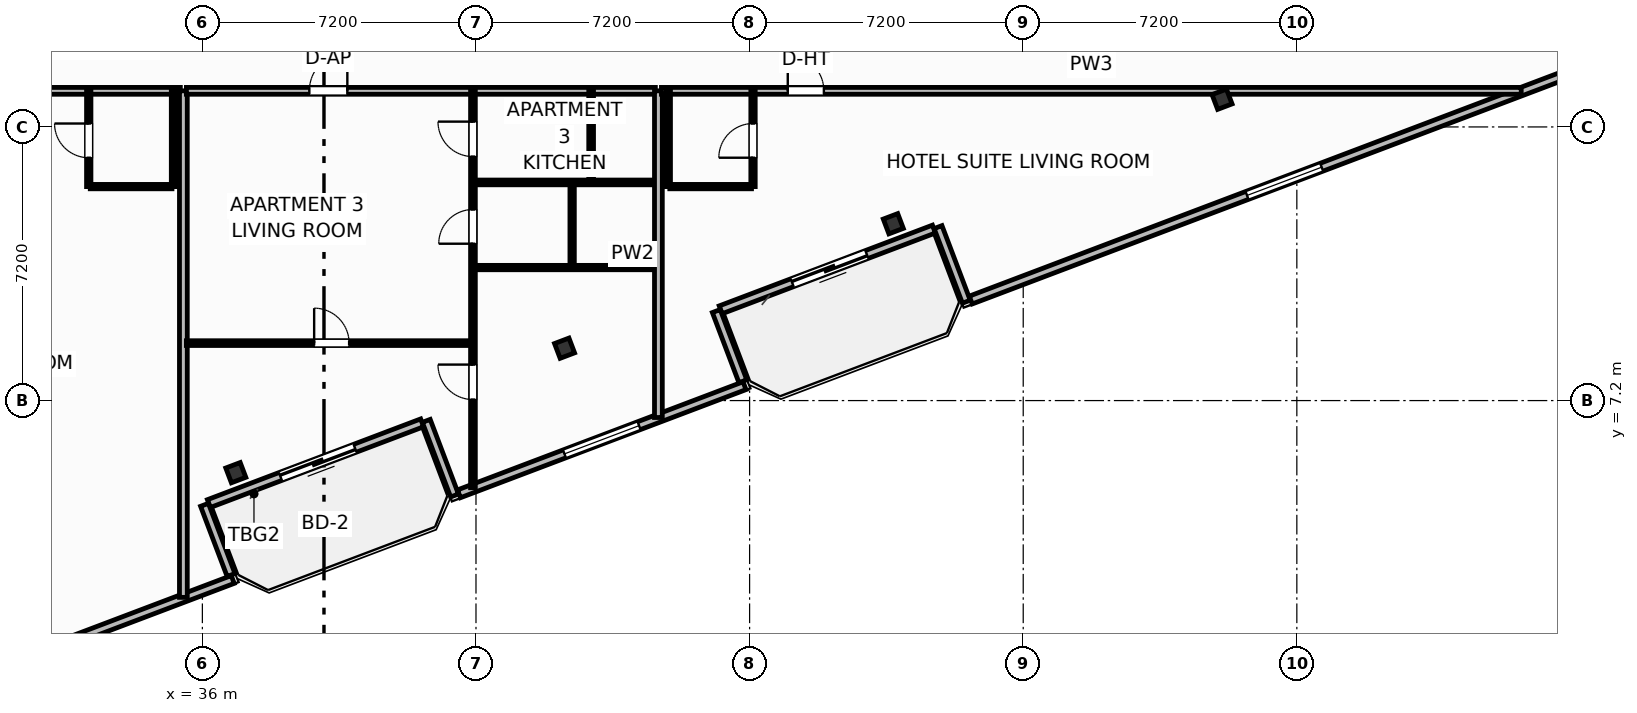
"""IFC4 building model, lengths in metres.
Left out: names, types, materials, properties, quantities, classifications, styles, units other than length and angle.
Written with IfcOpenShell. Run it as: python <this file> out.ifc"""

import sys

from ifc_helpers import new_model, si_unit, direction, frame, frame_2d, origin, origin_2d, place, context, subcontext, project, spatial, rectangle, i_section, extrude, element, fill, save


model = new_model("IFC4")
c1 = context("Model", 3, precision=1e-05, world=origin(), true_north=direction((0.0, 1.0)))
c2 = subcontext(c1, "Body", "Model", "MODEL_VIEW")
j1 = project(units=[si_unit("LENGTHUNIT", "METRE"), si_unit("PLANEANGLEUNIT", "RADIAN")], contexts=[c1])
p1 = place(None, origin())
s1 = spatial("IfcSite", under=j1, at=p1, CompositionType="ELEMENT")
p2 = place(p1, origin())
s2 = spatial("IfcBuilding", under=s1, at=p2, CompositionType="ELEMENT")
p3 = place(p2, frame((0.0, 0.0, 231.2)))
s3 = spatial("IfcBuildingStorey", under=s2, at=p3, CompositionType="ELEMENT", Elevation=231.2)
for number, where, z_axis, x_axis in (
    (1, (36.88, 5.303, 0.0), (0.0, 0.0, 1.0), (0.935, 0.354, 0.0)),
    (2, (45.531, 8.578, 0.0), (0.0, 0.0, 1.0), (0.935, 0.354, 0.0)),
    (3, (54.181, 11.853, 0.0), (0.0, 0.0, 1.0), (0.935, 0.354, 0.0)),
    (4, (62.832, 15.128, 0.0), (0.0, 0.0, 1.0), (0.935, 0.354, 0.0)),
):
    element("IfcColumn", number, at=place(p3, frame(where, z_axis=z_axis, x_axis=x_axis)), inside=s3, PredefinedType="COLUMN", context=c2, shape_type="SweptSolid", body=[
        extrude(i_section(OverallWidth=0.406, OverallDepth=0.416, WebThickness=0.03, FlangeThickness=0.048, FilletRadius=0.025, at=origin_2d()), origin(), (0.0, 0.0, 1.0), 3.7),
    ])
p4 = place(p3, frame((41.783, 6.614, 0.0), z_axis=(0.0, 0.0, 1.0), x_axis=(-0.93521416643, -0.354082565101, 0.0)))
e5 = element("IfcWall", 5, at=p4, inside=s3, PredefinedType="SOLIDWALL", context=c2, shape_type="SweptSolid", body=[
    extrude(rectangle(XDim=6.0, YDim=0.22, at=frame_2d((3.0, 0.0))), origin(), (0.0, 0.0, 1.0), 2.73),
])
p5 = place(p4, frame((1.888, 0.0, 0.0)))
e6 = element("IfcOpeningElement", 6, at=p5, cuts=e5, PredefinedType="OPENING", context=c2, shape_type="SweptSolid", body=[
    extrude(rectangle(XDim=2.1, YDim=2.3, at=frame_2d((1.05, 1.15))), frame((0.0, 0.12, 0.0), z_axis=(0.0, -1.0, 0.0), x_axis=(1.0, 0.0, 0.0)), (0.0, 0.0, 1.0), 0.24),
])
p6 = place(p3, frame((55.25, 11.713, 0.0), z_axis=(0.0, 0.0, 1.0), x_axis=(-0.935227640088, -0.354046976001, 0.0)))
e7 = element("IfcWall", 7, at=p6, inside=s3, PredefinedType="SOLIDWALL", context=c2, shape_type="SweptSolid", body=[
    extrude(rectangle(XDim=6.0, YDim=0.22, at=frame_2d((3.0, 0.0))), origin(), (0.0, 0.0, 1.0), 2.73),
])
p7 = place(p6, frame((1.888, 0.0, 0.0)))
e8 = element("IfcOpeningElement", 8, at=p7, cuts=e7, PredefinedType="OPENING", context=c2, shape_type="SweptSolid", body=[
    extrude(rectangle(XDim=2.1, YDim=2.3, at=frame_2d((1.05, 1.15))), frame((0.0, 0.12, 0.0), z_axis=(0.0, -1.0, 0.0), x_axis=(1.0, 0.0, 0.0)), (0.0, 0.0, 1.0), 0.24),
])
p8 = place(p3, frame((20.202, -3.791, 0.0), z_axis=(0.0, 0.0, 1.0), x_axis=(0.935225574232, 0.354052432984, 0.0)))
e9 = element("IfcWall", 9, at=p8, inside=s3, PredefinedType="SOLIDWALL", context=c2, shape_type="SweptSolid", body=[
    extrude(rectangle(XDim=17.747, YDim=0.22, at=frame_2d((8.874, 0.0))), origin(), (0.0, 0.0, 1.0), 2.73),
])
p9 = place(p8, frame((7.823, 0.0, 0.8)))
e10 = element("IfcOpeningElement", 10, at=p9, cuts=e9, PredefinedType="OPENING", context=c2, shape_type="SweptSolid", body=[
    extrude(rectangle(XDim=2.1, YDim=1.75, at=frame_2d((1.05, 0.875))), frame((0.0, 0.12, 0.0), z_axis=(0.0, -1.0, 0.0), x_axis=(1.0, 0.0, 0.0)), (0.0, 0.0, 1.0), 0.24),
])
p10 = place(p3, frame((36.755, 2.61, 0.0), z_axis=(0.0, 0.0, 1.0), x_axis=(-0.354020680661, 0.935237594232, 0.0)))
e11 = element("IfcWall", 11, at=p10, inside=s3, PredefinedType="SOLIDWALL", context=c2, shape_type="SweptSolid", body=[
    extrude(rectangle(XDim=1.975, YDim=0.22, at=frame_2d((0.988, 0.0))), origin(), (0.0, 0.0, 1.0), 2.73),
])
p11 = place(p3, frame((41.892, 6.666, 0.0), z_axis=(0.0, 0.0, 1.0), x_axis=(0.354128469405, -0.935196785258, 0.0)))
e12 = element("IfcWall", 12, at=p11, inside=s3, PredefinedType="SOLIDWALL", context=c2, shape_type="SweptSolid", body=[
    extrude(rectangle(XDim=2.1, YDim=0.22, at=frame_2d((1.05, 0.0))), origin(), (0.0, 0.0, 1.0), 2.73),
])
p12 = place(p3, frame((42.752, 4.746, 0.0), z_axis=(0.0, 0.0, 1.0), x_axis=(0.935216926991, 0.354075273733, 0.0)))
e13 = element("IfcWall", 13, at=p12, inside=s3, PredefinedType="SOLIDWALL", context=c2, shape_type="SweptSolid", body=[
    extrude(rectangle(XDim=8.035, YDim=0.22, at=frame_2d((4.018, 0.0))), origin(), (0.0, 0.0, 1.0), 2.73),
])
p13 = place(p12, frame((2.968, 0.0, 0.8)))
e14 = element("IfcOpeningElement", 14, at=p13, cuts=e13, PredefinedType="OPENING", context=c2, shape_type="SweptSolid", body=[
    extrude(rectangle(XDim=2.1, YDim=1.75, at=frame_2d((1.05, 0.875))), frame((0.0, 0.12, 0.0), z_axis=(0.0, -1.0, 0.0), x_axis=(1.0, 0.0, 0.0)), (0.0, 0.0, 1.0), 0.24),
])
p14 = place(p3, frame((50.223, 7.708, 0.0), z_axis=(0.0, 0.0, 1.0), x_axis=(-0.354020680661, 0.935237594232, 0.0)))
e15 = element("IfcWall", 15, at=p14, inside=s3, PredefinedType="SOLIDWALL", context=c2, shape_type="SweptSolid", body=[
    extrude(rectangle(XDim=1.975, YDim=0.22, at=frame_2d((0.988, 0.0))), origin(), (0.0, 0.0, 1.0), 2.73),
])
p15 = place(p3, frame((55.359, 11.764, 0.0), z_axis=(0.0, 0.0, 1.0), x_axis=(0.354026782794, -0.935235284334, 0.0)))
e16 = element("IfcWall", 16, at=p15, inside=s3, PredefinedType="SOLIDWALL", context=c2, shape_type="SweptSolid", body=[
    extrude(rectangle(XDim=2.1, YDim=0.22, at=frame_2d((1.05, 0.0))), origin(), (0.0, 0.0, 1.0), 2.73),
])
p16 = place(p3, frame((56.219, 9.845, 0.0), z_axis=(0.0, 0.0, 1.0), x_axis=(0.935225601791, 0.354052360188, 0.0)))
e17 = element("IfcWall", 17, at=p16, inside=s3, PredefinedType="SOLIDWALL", context=c2, shape_type="SweptSolid", body=[
    extrude(rectangle(XDim=17.647, YDim=0.22, at=frame_2d((8.824, 0.0))), origin(), (0.0, 0.0, 1.0), 2.73),
])
p17 = place(p16, frame((7.774, 0.0, 0.8)))
e18 = element("IfcOpeningElement", 18, at=p17, cuts=e17, PredefinedType="OPENING", context=c2, shape_type="SweptSolid", body=[
    extrude(rectangle(XDim=2.1, YDim=1.75, at=frame_2d((1.05, 0.875))), frame((0.0, 0.12, 0.0), z_axis=(0.0, -1.0, 0.0), x_axis=(1.0, 0.0, 0.0)), (0.0, 0.0, 1.0), 0.24),
])
p18 = place(p3, frame((23.08, 15.35, 0.0), z_axis=(0.0, 0.0, 1.0), x_axis=(1.0, 0.0, 0.0)))
e19 = element("IfcWall", 19, at=p18, inside=s3, PredefinedType="PARTITIONING", context=c2, shape_type="SweptSolid", body=[
    extrude(rectangle(XDim=12.34, YDim=0.18, at=frame_2d((6.17, 0.0))), origin(), (0.0, 0.0, 1.0), 3.45),
])
p19 = place(p18, frame((0.933, 0.0, 0.0)))
e20 = element("IfcOpeningElement", 20, at=p19, cuts=e19, PredefinedType="OPENING", context=c2, shape_type="SweptSolid", body=[
    extrude(rectangle(XDim=0.95, YDim=2.15, at=frame_2d((0.475, 1.075))), frame((0.0, 0.1, 0.0), z_axis=(0.0, -1.0, 0.0), x_axis=(1.0, 0.0, 0.0)), (0.0, 0.0, 1.0), 0.2),
])
p20 = place(p3, frame((33.05, 12.83, 0.0), z_axis=(0.0, 0.0, 1.0), x_axis=(1.0, 0.0, 0.0)))
e21 = element("IfcWall", 21, at=p20, inside=s3, PredefinedType="PARTITIONING", context=c2, shape_type="SweptSolid", body=[
    extrude(rectangle(XDim=2.15, YDim=0.115, at=frame_2d((1.075, 0.0))), origin(), (0.0, 0.0, 1.0), 3.45),
])
p21 = place(p3, frame((33.01, 12.83, 0.0), z_axis=(0.0, 0.0, 1.0), x_axis=(0.0, 1.0, 0.0)))
e22 = element("IfcWall", 22, at=p21, inside=s3, PredefinedType="PARTITIONING", context=c2, shape_type="SweptSolid", body=[
    extrude(rectangle(XDim=2.52, YDim=0.115, at=frame_2d((1.26, 0.0))), origin(), (0.0, 0.0, 1.0), 3.45),
])
p22 = place(p21, frame((0.76, 0.0, 0.0)))
e23 = element("IfcOpeningElement", 23, at=p22, cuts=e22, PredefinedType="OPENING", context=c2, shape_type="SweptSolid", body=[
    extrude(rectangle(XDim=0.9, YDim=2.05, at=frame_2d((0.45, 1.025))), frame((0.0, 0.067, 0.0), z_axis=(0.0, -1.0, 0.0), x_axis=(1.0, 0.0, 0.0)), (0.0, 0.0, 1.0), 0.135),
])
p23 = place(p3, frame((35.24, 12.83, 0.0), z_axis=(0.0, 0.0, 1.0), x_axis=(0.0, 1.0, 0.0)))
e24 = element("IfcWall", 24, at=p23, inside=s3, PredefinedType="PARTITIONING", context=c2, shape_type="SweptSolid", body=[
    extrude(rectangle(XDim=2.52, YDim=0.115, at=frame_2d((1.26, 0.0))), origin(), (0.0, 0.0, 1.0), 2.739),
])
p24 = place(p3, frame((35.5, 2.022, 0.0), z_axis=(0.0, 0.0, 1.0), x_axis=(0.0, 1.0, 0.0)))
e25 = element("IfcWall", 25, at=p24, inside=s3, PredefinedType="PARTITIONING", context=c2, shape_type="SweptSolid", body=[
    extrude(rectangle(XDim=13.328, YDim=0.205, at=frame_2d((6.664, 0.0))), origin(), (0.0, 0.0, 1.0), 2.739),
])
p25 = place(p3, frame((35.58, 8.712, 0.0), z_axis=(0.0, 0.0, 1.0), x_axis=(1.0, 0.0, 0.0)))
e26 = element("IfcWall", 26, at=p25, inside=s3, PredefinedType="PARTITIONING", context=c2, shape_type="SweptSolid", body=[
    extrude(rectangle(XDim=7.47, YDim=0.125, at=frame_2d((3.735, 0.0))), origin(), (0.0, 0.0, 1.0), 3.45),
])
p26 = place(p25, frame((3.362, 0.0, 0.0)))
e27 = element("IfcOpeningElement", 27, at=p26, cuts=e26, PredefinedType="OPENING", context=c2, shape_type="SweptSolid", body=[
    extrude(rectangle(XDim=0.92, YDim=2.05, at=frame_2d((0.46, 1.025))), frame((0.0, 0.073, 0.0), z_axis=(0.0, -1.0, 0.0), x_axis=(1.0, 0.0, 0.0)), (0.0, 0.0, 1.0), 0.145),
])
p27 = place(p3, frame((35.58, 15.35, 0.0), z_axis=(0.0, 0.0, 1.0), x_axis=(1.0, 0.0, 0.0)))
e28 = element("IfcWall", 28, at=p27, inside=s3, PredefinedType="PARTITIONING", context=c2, shape_type="SweptSolid", body=[
    extrude(rectangle(XDim=12.34, YDim=0.18, at=frame_2d((6.17, 0.0))), origin(), (0.0, 0.0, 1.0), 3.45),
])
p28 = place(p27, frame((3.235, 0.0, 0.0)))
e29 = element("IfcOpeningElement", 29, at=p28, cuts=e28, PredefinedType="OPENING", context=c2, shape_type="SweptSolid", body=[
    extrude(rectangle(XDim=1.0, YDim=2.2, at=frame_2d((0.5, 1.1))), frame((0.0, 0.1, 0.0), z_axis=(0.0, -1.0, 0.0), x_axis=(1.0, 0.0, 0.0)), (0.0, 0.0, 1.0), 0.2),
])
p29 = place(p3, frame((43.12, 4.907, 0.0), z_axis=(0.0, 0.0, 1.0), x_axis=(0.0, 1.0, 0.0)))
e30 = element("IfcWall", 30, at=p29, inside=s3, PredefinedType="PARTITIONING", context=c2, shape_type="SweptSolid", body=[
    extrude(rectangle(XDim=10.443, YDim=0.125, at=frame_2d((5.222, 0.0))), origin(), (0.0, 0.0, 1.0), 3.45),
])
p30 = place(p29, frame((2.32, 0.0, 0.0)))
e31 = element("IfcOpeningElement", 31, at=p30, cuts=e30, PredefinedType="OPENING", context=c2, shape_type="SweptSolid", body=[
    extrude(rectangle(XDim=0.92, YDim=2.05, at=frame_2d((0.46, 1.025))), frame((0.0, 0.073, 0.0), z_axis=(0.0, -1.0, 0.0), x_axis=(1.0, 0.0, 0.0)), (0.0, 0.0, 1.0), 0.145),
])
p31 = place(p29, frame((6.42, 0.0, 0.0)))
e32 = element("IfcOpeningElement", 32, at=p31, cuts=e30, PredefinedType="OPENING", context=c2, shape_type="SweptSolid", body=[
    extrude(rectangle(XDim=0.9, YDim=2.05, at=frame_2d((0.45, 1.025))), frame((0.0, 0.073, 0.0), z_axis=(0.0, -1.0, 0.0), x_axis=(1.0, 0.0, 0.0)), (0.0, 0.0, 1.0), 0.145),
])
p32 = place(p29, frame((8.713, 0.0, 0.0)))
e33 = element("IfcOpeningElement", 33, at=p32, cuts=e30, PredefinedType="OPENING", context=c2, shape_type="SweptSolid", body=[
    extrude(rectangle(XDim=0.92, YDim=2.05, at=frame_2d((0.46, 1.025))), frame((0.0, 0.073, 0.0), z_axis=(0.0, -1.0, 0.0), x_axis=(1.0, 0.0, 0.0)), (0.0, 0.0, 1.0), 0.145),
])
p33 = place(p3, frame((43.19, 12.94, 0.0), z_axis=(0.0, 0.0, 1.0), x_axis=(1.0, 0.0, 0.0)))
e34 = element("IfcWall", 34, at=p33, inside=s3, PredefinedType="PARTITIONING", context=c2, shape_type="SweptSolid", body=[
    extrude(rectangle(XDim=4.73, YDim=0.125, at=frame_2d((2.365, 0.0))), origin(), (0.0, 0.0, 1.0), 3.018),
])
p34 = place(p3, frame((43.19, 10.7, 0.0), z_axis=(0.0, 0.0, 1.0), x_axis=(1.0, 0.0, 0.0)))
e35 = element("IfcWall", 35, at=p34, inside=s3, PredefinedType="PARTITIONING", context=c2, shape_type="SweptSolid", body=[
    extrude(rectangle(XDim=4.73, YDim=0.115, at=frame_2d((2.365, 0.0))), origin(), (0.0, 0.0, 1.0), 3.45),
])
p35 = place(p3, frame((46.23, 12.94, 0.0), z_axis=(0.0, 0.0, 1.0), x_axis=(0.0, 1.0, 0.0)))
e36 = element("IfcWall", 36, at=p35, inside=s3, PredefinedType="PARTITIONING", context=c2, shape_type="SweptSolid", body=[
    extrude(rectangle(XDim=2.41, YDim=0.125, at=frame_2d((1.205, 0.0))), origin(), (0.0, 0.0, 1.0), 3.45),
])
p36 = place(p3, frame((45.73, 10.7, 0.0), z_axis=(0.0, 0.0, 1.0), x_axis=(0.0, 1.0, 0.0)))
e37 = element("IfcWall", 37, at=p36, inside=s3, PredefinedType="PARTITIONING", context=c2, shape_type="SweptSolid", body=[
    extrude(rectangle(XDim=2.24, YDim=0.115, at=frame_2d((1.12, 0.0))), origin(), (0.0, 0.0, 1.0), 3.45),
])
p37 = place(p3, frame((48.0, 6.754, 0.0), z_axis=(0.0, 0.0, 1.0), x_axis=(0.0, 1.0, 0.0)))
e38 = element("IfcWall", 38, at=p37, inside=s3, PredefinedType="PARTITIONING", context=c2, shape_type="SweptSolid", body=[
    extrude(rectangle(XDim=8.596, YDim=0.205, at=frame_2d((4.298, 0.0))), origin(), (0.0, 0.0, 1.0), 3.45),
])
p38 = place(p3, frame((48.08, 15.35, 0.0), z_axis=(0.0, 0.0, 1.0), x_axis=(1.0, 0.0, 0.0)))
e39 = element("IfcWall", 39, at=p38, inside=s3, PredefinedType="PARTITIONING", context=c2, shape_type="SweptSolid", body=[
    extrude(rectangle(XDim=22.624, YDim=0.18, at=frame_2d((11.312, 0.0))), origin(), (0.0, 0.0, 1.0), 3.45),
])
p39 = place(p38, frame((3.324, 0.0, 0.0)))
e40 = element("IfcOpeningElement", 40, at=p39, cuts=e39, PredefinedType="OPENING", context=c2, shape_type="SweptSolid", body=[
    extrude(rectangle(XDim=0.95, YDim=2.15, at=frame_2d((0.475, 1.075))), frame((0.0, 0.1, 0.0), z_axis=(0.0, -1.0, 0.0), x_axis=(1.0, 0.0, 0.0)), (0.0, 0.0, 1.0), 0.2),
])
p40 = place(p3, frame((48.3, 12.83, 0.0), z_axis=(0.0, 0.0, 1.0), x_axis=(1.0, 0.0, 0.0)))
e41 = element("IfcWall", 41, at=p40, inside=s3, PredefinedType="PARTITIONING", context=c2, shape_type="SweptSolid", body=[
    extrude(rectangle(XDim=2.15, YDim=0.115, at=frame_2d((1.075, 0.0))), origin(), (0.0, 0.0, 1.0), 3.45),
])
p41 = place(p3, frame((50.49, 12.83, 0.0), z_axis=(0.0, 0.0, 1.0), x_axis=(0.0, 1.0, 0.0)))
e42 = element("IfcWall", 42, at=p41, inside=s3, PredefinedType="PARTITIONING", context=c2, shape_type="SweptSolid", body=[
    extrude(rectangle(XDim=2.52, YDim=0.115, at=frame_2d((1.26, 0.0))), origin(), (0.0, 0.0, 1.0), 3.45),
])
p42 = place(p41, frame((0.76, 0.0, 0.0)))
e43 = element("IfcOpeningElement", 43, at=p42, cuts=e42, PredefinedType="OPENING", context=c2, shape_type="SweptSolid", body=[
    extrude(rectangle(XDim=0.9, YDim=2.05, at=frame_2d((0.45, 1.025))), frame((0.0, 0.067, 0.0), z_axis=(0.0, -1.0, 0.0), x_axis=(1.0, 0.0, 0.0)), (0.0, 0.0, 1.0), 0.135),
])
p43 = place(p3, frame((48.26, 12.83, 0.0), z_axis=(0.0, 0.0, 1.0), x_axis=(0.0, 1.0, 0.0)))
e44 = element("IfcWall", 44, at=p43, inside=s3, PredefinedType="PARTITIONING", context=c2, shape_type="SweptSolid", body=[
    extrude(rectangle(XDim=2.52, YDim=0.115, at=frame_2d((1.26, 0.0))), origin(), (0.0, 0.0, 1.0), 3.45),
])
p44 = place(p5, origin())
e45 = element("IfcDoor", 45, at=p44, inside=s3, OperationType="SLIDING_TO_LEFT", PredefinedType="DOOR", context=c2, shape_type="SweptSolid", body=[
    extrude(rectangle(XDim=2.1, YDim=2.3, at=frame_2d((1.05, 1.15))), frame((0.0, 0.025, 0.0), z_axis=(0.0, -1.0, 0.0), x_axis=(1.0, 0.0, 0.0)), (0.0, 0.0, 1.0), 0.05),
])
fill(e6, e45)
p45 = place(p7, origin())
e46 = element("IfcDoor", 46, at=p45, inside=s3, OperationType="SLIDING_TO_LEFT", PredefinedType="DOOR", context=c2, shape_type="SweptSolid", body=[
    extrude(rectangle(XDim=2.1, YDim=2.3, at=frame_2d((1.05, 1.15))), frame((0.0, 0.025, 0.0), z_axis=(0.0, -1.0, 0.0), x_axis=(1.0, 0.0, 0.0)), (0.0, 0.0, 1.0), 0.05),
])
fill(e8, e46)
p46 = place(p13, origin())
e47 = element("IfcWindow", 47, at=p46, inside=s3, PartitioningType="SINGLE_PANEL", PredefinedType="WINDOW", context=c2, shape_type="SweptSolid", body=[
    extrude(rectangle(XDim=2.1, YDim=1.75, at=frame_2d((1.05, 0.875))), frame((0.0, 0.03, 0.0), z_axis=(0.0, -1.0, 0.0), x_axis=(1.0, 0.0, 0.0)), (0.0, 0.0, 1.0), 0.06),
])
fill(e14, e47)
p47 = place(p17, origin())
e48 = element("IfcWindow", 48, at=p47, inside=s3, PartitioningType="SINGLE_PANEL", PredefinedType="WINDOW", context=c2, shape_type="SweptSolid", body=[
    extrude(rectangle(XDim=2.1, YDim=1.75, at=frame_2d((1.05, 0.875))), frame((0.0, 0.03, 0.0), z_axis=(0.0, -1.0, 0.0), x_axis=(1.0, 0.0, 0.0)), (0.0, 0.0, 1.0), 0.06),
])
fill(e18, e48)
p48 = place(p22, origin())
e49 = element("IfcDoor", 49, at=p48, inside=s3, OperationType="SINGLE_SWING_RIGHT", PredefinedType="DOOR", context=c2, shape_type="SweptSolid", body=[
    extrude(rectangle(XDim=0.9, YDim=2.05, at=frame_2d((0.45, 1.025))), frame((0.0, 0.025, 0.0), z_axis=(0.0, -1.0, 0.0), x_axis=(1.0, 0.0, 0.0)), (0.0, 0.0, 1.0), 0.05),
])
fill(e23, e49)
p49 = place(p26, origin())
e50 = element("IfcDoor", 50, at=p49, inside=s3, OperationType="SINGLE_SWING_LEFT", PredefinedType="DOOR", context=c2, shape_type="SweptSolid", body=[
    extrude(rectangle(XDim=0.92, YDim=2.05, at=frame_2d((0.46, 1.025))), frame((0.0, 0.025, 0.0), z_axis=(0.0, -1.0, 0.0), x_axis=(1.0, 0.0, 0.0)), (0.0, 0.0, 1.0), 0.05),
])
fill(e27, e50)
p50 = place(p28, origin())
e51 = element("IfcDoor", 51, at=p50, inside=s3, OperationType="SINGLE_SWING_RIGHT", PredefinedType="DOOR", context=c2, shape_type="SweptSolid", body=[
    extrude(rectangle(XDim=1.0, YDim=2.2, at=frame_2d((0.5, 1.1))), frame((0.0, 0.025, 0.0), z_axis=(0.0, -1.0, 0.0), x_axis=(1.0, 0.0, 0.0)), (0.0, 0.0, 1.0), 0.05),
])
fill(e29, e51)
p51 = place(p30, origin())
e52 = element("IfcDoor", 52, at=p51, inside=s3, OperationType="SINGLE_SWING_RIGHT", PredefinedType="DOOR", context=c2, shape_type="SweptSolid", body=[
    extrude(rectangle(XDim=0.92, YDim=2.05, at=frame_2d((0.46, 1.025))), frame((0.0, 0.025, 0.0), z_axis=(0.0, -1.0, 0.0), x_axis=(1.0, 0.0, 0.0)), (0.0, 0.0, 1.0), 0.05),
])
fill(e31, e52)
p52 = place(p31, origin())
e53 = element("IfcDoor", 53, at=p52, inside=s3, OperationType="SINGLE_SWING_LEFT", PredefinedType="DOOR", context=c2, shape_type="SweptSolid", body=[
    extrude(rectangle(XDim=0.9, YDim=2.05, at=frame_2d((0.45, 1.025))), frame((0.0, 0.025, 0.0), z_axis=(0.0, -1.0, 0.0), x_axis=(1.0, 0.0, 0.0)), (0.0, 0.0, 1.0), 0.05),
])
fill(e32, e53)
p53 = place(p32, origin())
e54 = element("IfcDoor", 54, at=p53, inside=s3, OperationType="SINGLE_SWING_RIGHT", PredefinedType="DOOR", context=c2, shape_type="SweptSolid", body=[
    extrude(rectangle(XDim=0.92, YDim=2.05, at=frame_2d((0.46, 1.025))), frame((0.0, 0.025, 0.0), z_axis=(0.0, -1.0, 0.0), x_axis=(1.0, 0.0, 0.0)), (0.0, 0.0, 1.0), 0.05),
])
fill(e33, e54)
p54 = place(p39, origin())
e55 = element("IfcDoor", 55, at=p54, inside=s3, OperationType="SINGLE_SWING_LEFT", PredefinedType="DOOR", context=c2, shape_type="SweptSolid", body=[
    extrude(rectangle(XDim=0.95, YDim=2.15, at=frame_2d((0.475, 1.075))), frame((0.0, 0.025, 0.0), z_axis=(0.0, -1.0, 0.0), x_axis=(1.0, 0.0, 0.0)), (0.0, 0.0, 1.0), 0.05),
])
fill(e40, e55)
p55 = place(p42, origin())
e56 = element("IfcDoor", 56, at=p55, inside=s3, OperationType="SINGLE_SWING_LEFT", PredefinedType="DOOR", context=c2, shape_type="SweptSolid", body=[
    extrude(rectangle(XDim=0.9, YDim=2.05, at=frame_2d((0.45, 1.025))), frame((0.0, 0.025, 0.0), z_axis=(0.0, -1.0, 0.0), x_axis=(1.0, 0.0, 0.0)), (0.0, 0.0, 1.0), 0.05),
])
fill(e43, e56)
save(model, sys.argv[1])
